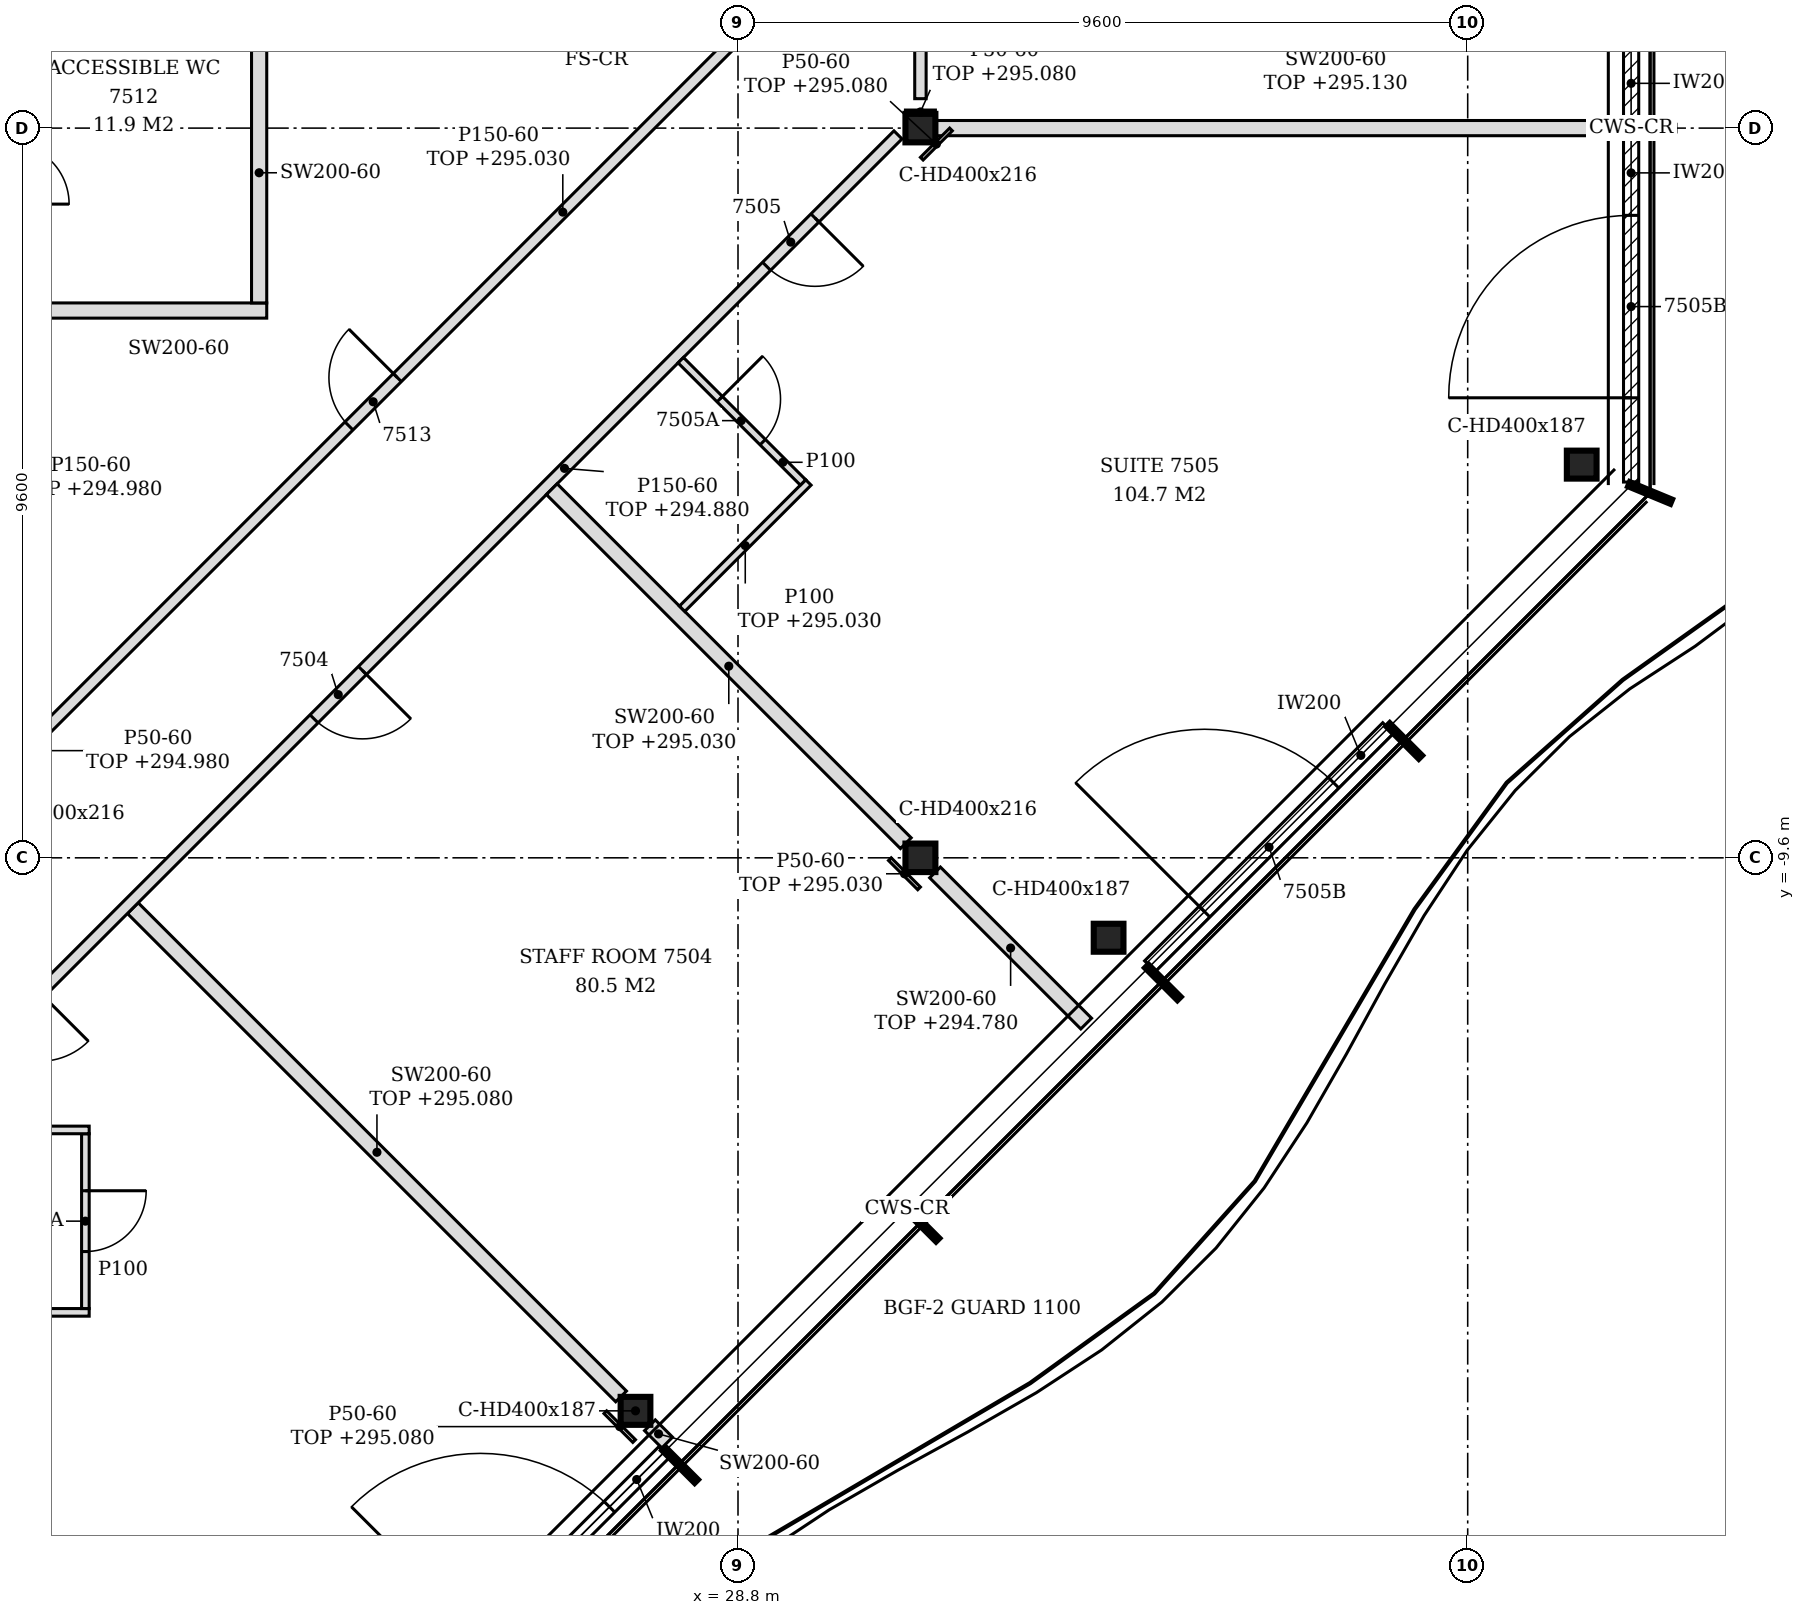
"""IFC4 building model, lengths in metres.
Left out: names, types, materials, properties, quantities, classifications, styles, units other than length and angle.
Written with IfcOpenShell. Run it as: python <this file> out.ifc"""

import sys

from ifc_helpers import new_model, si_unit, direction, frame, frame_2d, origin, origin_2d, place, context, subcontext, project, spatial, polyline, rectangle, i_section, outline, extrude, element, fill, save


model = new_model("IFC4")
c1 = context("Model", 3, precision=1e-05, world=origin(), true_north=direction((0.0, 1.0)))
c2 = subcontext(c1, "Body", "Model", "MODEL_VIEW")
j1 = project(units=[si_unit("LENGTHUNIT", "METRE"), si_unit("PLANEANGLEUNIT", "RADIAN")], contexts=[c1])
p1 = place(None, origin())
s1 = spatial("IfcSite", under=j1, at=p1, CompositionType="ELEMENT")
p2 = place(p1, origin())
s2 = spatial("IfcBuilding", under=s1, at=p2, CompositionType="ELEMENT")
p3 = place(p2, frame((0.0, 0.0, 292.2)))
s3 = spatial("IfcBuildingStorey", under=s2, at=p3, CompositionType="ELEMENT", Elevation=292.2)
for number, where, z_axis, x_axis in (
    (1, (27.451, -16.876, -0.15), (0.0, 0.0, 1.0), (1.0, 0.0, 0.0)),
    (2, (33.676, -10.652, -0.15), (0.0, 0.0, 1.0), (1.0, 0.0, 0.0)),
    (3, (39.9, -4.427, -0.15), (0.0, 0.0, 1.0), (1.0, 0.0, 0.0)),
):
    element("IfcColumn", number, at=place(p3, frame(where, z_axis=z_axis, x_axis=x_axis)), inside=s3, PredefinedType="COLUMN", context=c2, shape_type="SweptSolid", body=[
        extrude(i_section(OverallWidth=0.391, OverallDepth=0.368, WebThickness=0.015, FlangeThickness=0.024, FilletRadius=0.015, at=origin_2d()), origin(), (0.0, 0.0, 1.0), 3.55),
    ])
for number, where, z_axis, x_axis in (
    (4, (31.2, -9.6, -0.15), (0.0, 0.0, 1.0), (1.0, 0.0, 0.0)),
    (5, (31.2, 0.0, -0.15), (0.0, 0.0, 1.0), (1.0, 0.0, 0.0)),
):
    element("IfcColumn", number, at=place(p3, frame(where, z_axis=z_axis, x_axis=x_axis)), inside=s3, PredefinedType="COLUMN", context=c2, shape_type="SweptSolid", body=[
        extrude(i_section(OverallWidth=0.394, OverallDepth=0.375, WebThickness=0.017, FlangeThickness=0.028, FilletRadius=0.015, at=origin_2d()), origin(), (0.0, 0.0, 1.0), 3.55),
    ])
p4 = place(p3, frame((24.693, -20.553, 0.0), z_axis=(0.0, 0.0, 1.0), x_axis=(0.707079231393, 0.707134329907, 0.0)))
e6 = element("IfcWall", 6, at=p4, inside=s3, PredefinedType="NOTDEFINED", context=c2, shape_type="SweptSolid", body=[
    extrude(rectangle(XDim=4.431, YDim=0.2, at=frame_2d((2.215, 0.0))), origin(), (0.0, 0.0, 1.0), 3.4),
])
p5 = place(p4, frame((1.015, 0.0, 0.0)))
e7 = element("IfcOpeningElement", 7, at=p5, cuts=e6, PredefinedType="OPENING", context=c2, shape_type="SweptSolid", body=[
    extrude(rectangle(XDim=2.4, YDim=2.4, at=frame_2d((1.2, 1.2))), frame((0.0, 0.11, 0.0), z_axis=(0.0, -1.0, 0.0), x_axis=(1.0, 0.0, 0.0)), (0.0, 0.0, 1.0), 0.22),
])
p6 = place(p3, frame((34.22, -11.026, 0.0), z_axis=(0.0, 0.0, 1.0), x_axis=(0.707134329907, 0.707079231393, 0.0)))
e8 = element("IfcWall", 8, at=p6, inside=s3, PredefinedType="NOTDEFINED", context=c2, shape_type="SweptSolid", body=[
    extrude(rectangle(XDim=4.431, YDim=0.2, at=frame_2d((2.215, 0.0))), origin(), (0.0, 0.0, 1.0), 3.4),
])
p7 = place(p6, frame((1.015, 0.0, 0.0)))
e9 = element("IfcOpeningElement", 9, at=p7, cuts=e8, PredefinedType="OPENING", context=c2, shape_type="SweptSolid", body=[
    extrude(rectangle(XDim=2.4, YDim=2.4, at=frame_2d((1.2, 1.2))), frame((0.0, 0.11, 0.0), z_axis=(0.0, -1.0, 0.0), x_axis=(1.0, 0.0, 0.0)), (0.0, 0.0, 1.0), 0.22),
])
p8 = place(p3, frame((40.55, -4.656, 0.0), z_axis=(0.0, 0.0, 1.0), x_axis=(0.0, 1.0, 0.0)))
e10 = element("IfcWall", 10, at=p8, inside=s3, PredefinedType="NOTDEFINED", context=c2, shape_type="SweptSolid", body=[
    extrude(rectangle(XDim=4.626, YDim=0.2, at=frame_2d((2.313, 0.0))), origin(), (0.0, 0.0, 1.0), 3.4),
])
p9 = place(p8, frame((1.108, 0.0, 0.0)))
e11 = element("IfcOpeningElement", 11, at=p9, cuts=e10, PredefinedType="OPENING", context=c2, shape_type="SweptSolid", body=[
    extrude(rectangle(XDim=2.4, YDim=2.4, at=frame_2d((1.2, 1.2))), frame((0.0, 0.11, 0.0), z_axis=(0.0, -1.0, 0.0), x_axis=(1.0, 0.0, 0.0)), (0.0, 0.0, 1.0), 0.22),
])
p10 = place(p3, frame((40.55, 0.03, 0.0), z_axis=(0.0, 0.0, 1.0), x_axis=(0.0, 1.0, 0.0)))
e12 = element("IfcWall", 12, at=p10, inside=s3, PredefinedType="NOTDEFINED", context=c2, shape_type="SweptSolid", body=[
    extrude(rectangle(XDim=4.626, YDim=0.2, at=frame_2d((2.313, 0.0))), origin(), (0.0, 0.0, 1.0), 3.4),
])
p11 = place(p10, frame((1.118, 0.0, 0.0)))
e13 = element("IfcOpeningElement", 13, at=p11, cuts=e12, PredefinedType="OPENING", context=c2, shape_type="SweptSolid", body=[
    extrude(rectangle(XDim=2.4, YDim=2.4, at=frame_2d((1.2, 1.2))), frame((0.0, 0.11, 0.0), z_axis=(0.0, -1.0, 0.0), x_axis=(1.0, 0.0, 0.0)), (0.0, 0.0, 1.0), 0.22),
])
p12 = place(p3, frame((27.869, -17.293, 0.0), z_axis=(0.0, 0.0, 1.0), x_axis=(-0.707106781187, 0.707106781187, 0.0)))
e14 = element("IfcWall", 14, at=p12, inside=s3, PredefinedType="PARTITIONING", context=c2, shape_type="SweptSolid", body=[
    extrude(rectangle(XDim=0.322, YDim=0.2, at=frame_2d((0.161, 0.0))), origin(), (0.0, 0.0, 1.0), 3.4),
])
p13 = place(p3, frame((27.262, -16.686, 0.0), z_axis=(0.0, 0.0, 1.0), x_axis=(-0.707106781187, 0.707106781187, 0.0)))
e15 = element("IfcWall", 15, at=p13, inside=s3, PredefinedType="PARTITIONING", context=c2, shape_type="SweptSolid", body=[
    extrude(rectangle(XDim=9.085, YDim=0.2, at=frame_2d((4.542, 0.0))), origin(), (0.0, 0.0, 1.0), 2.88),
])
p14 = place(p3, frame((17.914, -15.58, 0.0), z_axis=(0.0, 0.0, 1.0), x_axis=(1.0, 0.0, 0.0)))
e16 = element("IfcWall", 16, at=p14, inside=s3, PredefinedType="PARTITIONING", context=c2, shape_type="SweptSolid", body=[
    extrude(outline(polyline([(0.0, 0.0), (2.35, 0.0), (2.35, 3.4), (1.436, 3.4), (1.434, 2.68), (1.136, 2.68), (1.134, 3.4), (0.0, 3.4), (0.0, 0.0)])), frame((0.0, 0.05, 0.0), z_axis=(0.0, -1.0, 0.0), x_axis=(1.0, 0.0, 0.0)), (0.0, 0.0, 1.0), 0.1),
])
p15 = place(p3, frame((20.214, -15.53, 0.0), z_axis=(0.0, 0.0, 1.0), x_axis=(0.0, 1.0, 0.0)))
e17 = element("IfcWall", 17, at=p15, inside=s3, PredefinedType="PARTITIONING", context=c2, shape_type="SweptSolid", body=[
    extrude(outline(polyline([(0.0, 0.0), (2.3, 0.0), (2.3, 3.4), (1.23, 3.4), (1.228, 2.88), (1.03, 2.88), (1.028, 3.4), (0.0, 3.4), (0.0, 0.0)])), frame((0.0, 0.05, 0.0), z_axis=(0.0, -1.0, 0.0), x_axis=(1.0, 0.0, 0.0)), (0.0, 0.0, 1.0), 0.1),
])
p16 = place(p15, frame((0.75, 0.0, 0.0)))
e18 = element("IfcOpeningElement", 18, at=p16, cuts=e17, PredefinedType="OPENING", context=c2, shape_type="SweptSolid", body=[
    extrude(rectangle(XDim=0.8, YDim=2.1, at=frame_2d((0.4, 1.05))), frame((0.0, 0.06, 0.0), z_axis=(0.0, -1.0, 0.0), x_axis=(1.0, 0.0, 0.0)), (0.0, 0.0, 1.0), 0.12),
])
p17 = place(p3, frame((16.722, -14.272, 0.0), z_axis=(0.0, 0.0, 1.0), x_axis=(0.707106781187, 0.707106781187, 0.0)))
e19 = element("IfcWall", 19, at=p17, inside=s3, PredefinedType="PARTITIONING", context=c2, shape_type="SweptSolid", body=[
    extrude(rectangle(XDim=20.058, YDim=0.15, at=frame_2d((10.029, 0.0))), origin(), (0.0, 0.0, 1.0), 2.68),
])
p18 = place(p17, frame((3.195, 0.0, 0.0)))
e20 = element("IfcOpeningElement", 20, at=p18, cuts=e19, PredefinedType="OPENING", context=c2, shape_type="SweptSolid", body=[
    extrude(rectangle(XDim=0.9, YDim=2.1, at=frame_2d((0.45, 1.05))), frame((0.0, 0.085, 0.0), z_axis=(0.0, -1.0, 0.0), x_axis=(1.0, 0.0, 0.0)), (0.0, 0.0, 1.0), 0.17),
])
p19 = place(p17, frame((9.193, 0.0, 0.0)))
e21 = element("IfcOpeningElement", 21, at=p19, cuts=e19, PredefinedType="OPENING", context=c2, shape_type="SweptSolid", body=[
    extrude(rectangle(XDim=0.9, YDim=2.1, at=frame_2d((0.45, 1.05))), frame((0.0, 0.085, 0.0), z_axis=(0.0, -1.0, 0.0), x_axis=(1.0, 0.0, 0.0)), (0.0, 0.0, 1.0), 0.17),
])
p20 = place(p17, frame((17.613, 0.0, 0.0)))
e22 = element("IfcOpeningElement", 22, at=p20, cuts=e19, PredefinedType="OPENING", context=c2, shape_type="SweptSolid", body=[
    extrude(rectangle(XDim=0.9, YDim=2.1, at=frame_2d((0.45, 1.05))), frame((0.0, 0.085, 0.0), z_axis=(0.0, -1.0, 0.0), x_axis=(1.0, 0.0, 0.0)), (0.0, 0.0, 1.0), 0.17),
])
p21 = place(p3, frame((17.97, -13.18, 0.0), z_axis=(0.0, 0.0, 1.0), x_axis=(1.0, 0.0, 0.0)))
e23 = element("IfcWall", 23, at=p21, inside=s3, PredefinedType="PARTITIONING", context=c2, shape_type="SweptSolid", body=[
    extrude(outline(polyline([(0.0, 0.0), (2.294, 0.0), (2.294, 3.4), (1.38, 3.4), (1.378, 2.68), (1.08, 2.68), (1.078, 3.4), (0.0, 3.4), (0.0, 0.0)])), frame((0.0, 0.05, 0.0), z_axis=(0.0, -1.0, 0.0), x_axis=(1.0, 0.0, 0.0)), (0.0, 0.0, 1.0), 0.1),
])
p22 = place(p3, frame((33.381, -11.781, 0.0), z_axis=(0.0, 0.0, 1.0), x_axis=(-0.707106781187, 0.707106781187, 0.0)))
e24 = element("IfcWall", 24, at=p22, inside=s3, PredefinedType="PARTITIONING", context=c2, shape_type="SweptSolid", body=[
    extrude(rectangle(XDim=2.812, YDim=0.2, at=frame_2d((1.406, 0.0))), origin(), (0.0, 0.0, 1.0), 2.58),
])
p23 = place(p3, frame((31.008, -9.408, 0.0), z_axis=(0.0, 0.0, 1.0), x_axis=(-0.707106781187, 0.707106781187, 0.0)))
e25 = element("IfcWall", 25, at=p23, inside=s3, PredefinedType="PARTITIONING", context=c2, shape_type="SweptSolid", body=[
    extrude(rectangle(XDim=6.587, YDim=0.2, at=frame_2d((3.293, 0.0))), origin(), (0.0, 0.0, 1.0), 2.83),
])
p24 = place(p3, frame((19.392, -8.208, 0.0), z_axis=(0.0, 0.0, 1.0), x_axis=(0.707106781187, 0.707106781187, 0.0)))
e26 = element("IfcWall", 26, at=p24, inside=s3, PredefinedType="PARTITIONING", context=c2, shape_type="SweptSolid", body=[
    extrude(rectangle(XDim=13.124, YDim=0.15, at=frame_2d((6.562, 0.0))), origin(), (0.0, 0.0, 1.0), 2.83),
])
p25 = place(p24, frame((6.066, 0.0, 0.0)))
e27 = element("IfcOpeningElement", 27, at=p25, cuts=e26, PredefinedType="OPENING", context=c2, shape_type="SweptSolid", body=[
    extrude(rectangle(XDim=0.9, YDim=2.1, at=frame_2d((0.45, 1.05))), frame((0.0, 0.085, 0.0), z_axis=(0.0, -1.0, 0.0), x_axis=(1.0, 0.0, 0.0)), (0.0, 0.0, 1.0), 0.17),
])
p26 = place(p3, frame((28.065, -6.323, 0.0), z_axis=(0.0, 0.0, 1.0), x_axis=(0.707106781187, 0.707106781187, 0.0)))
e28 = element("IfcWall", 28, at=p26, inside=s3, PredefinedType="PARTITIONING", context=c2, shape_type="SweptSolid", body=[
    extrude(rectangle(XDim=2.35, YDim=0.1, at=frame_2d((1.175, 0.0))), origin(), (0.0, 0.0, 1.0), 2.83),
])
p27 = place(p3, frame((29.656, -4.662, 0.0), z_axis=(0.0, 0.0, 1.0), x_axis=(-0.707053116953, 0.707160441348, 0.0)))
e29 = element("IfcWall", 29, at=p27, inside=s3, PredefinedType="PARTITIONING", context=c2, shape_type="SweptSolid", body=[
    extrude(rectangle(XDim=2.275, YDim=0.1, at=frame_2d((1.137, 0.0))), origin(), (0.0, 0.0, 1.0), 3.4),
])
p28 = place(p27, frame((0.75, 0.0, 0.0)))
e30 = element("IfcOpeningElement", 30, at=p28, cuts=e29, PredefinedType="OPENING", context=c2, shape_type="SweptSolid", body=[
    extrude(rectangle(XDim=0.8, YDim=2.1, at=frame_2d((0.4, 1.05))), frame((0.0, 0.06, 0.0), z_axis=(0.0, -1.0, 0.0), x_axis=(1.0, 0.0, 0.0)), (0.0, 0.0, 1.0), 0.12),
])
p29 = place(p3, frame((19.275, -2.4, 0.0), z_axis=(0.0, 0.0, 1.0), x_axis=(1.0, 0.0, 0.0)))
e31 = element("IfcWall", 31, at=p29, inside=s3, PredefinedType="PARTITIONING", context=c2, shape_type="SweptSolid", body=[
    extrude(outline(polyline([(0.0, 0.0), (3.325, 0.0), (3.325, 3.4), (0.075, 3.4), (0.073, 2.78), (0.0, 2.78), (0.0, 0.0)])), frame((0.0, 0.1, 0.0), z_axis=(0.0, -1.0, 0.0), x_axis=(1.0, 0.0, 0.0)), (0.0, 0.0, 1.0), 0.2),
])
p30 = place(p3, frame((22.5, -2.3, 0.0), z_axis=(0.0, 0.0, 1.0), x_axis=(0.0, 1.0, 0.0)))
e32 = element("IfcWall", 32, at=p30, inside=s3, PredefinedType="PARTITIONING", context=c2, shape_type="SweptSolid", body=[
    extrude(outline(polyline([(0.0, 0.0), (3.425, 0.0), (3.425, 3.4), (2.405, 3.4), (2.403, 2.83), (2.195, 2.83), (2.193, 3.4), (0.0, 3.4), (0.0, 0.0)])), frame((0.0, 0.1, 0.0), z_axis=(0.0, -1.0, 0.0), x_axis=(1.0, 0.0, 0.0)), (0.0, 0.0, 1.0), 0.2),
])
p31 = place(p3, frame((31.397, 0.0, 0.0), z_axis=(0.0, 0.0, 1.0), x_axis=(1.0, 0.0, 0.0)))
e33 = element("IfcWall", 33, at=p31, inside=s3, PredefinedType="PARTITIONING", context=c2, shape_type="SweptSolid", body=[
    extrude(outline(polyline([(0.0, 0.0), (9.053, 0.0), (9.053, 2.93), (8.653, 2.93), (8.651, 2.88), (8.353, 2.88), (8.351, 2.93), (0.0, 2.93), (0.0, 0.0)])), frame((0.0, 0.1, 0.0), z_axis=(0.0, -1.0, 0.0), x_axis=(1.0, 0.0, 0.0)), (0.0, 0.0, 1.0), 0.2),
])
p32 = place(p3, frame((31.2, 0.387, 0.0), z_axis=(0.0, 0.0, 1.0), x_axis=(0.0, 1.0, 0.0)))
e34 = element("IfcWall", 34, at=p32, inside=s3, PredefinedType="PARTITIONING", context=c2, shape_type="SweptSolid", body=[
    extrude(rectangle(XDim=4.313, YDim=0.15, at=frame_2d((2.156, 0.0))), origin(), (0.0, 0.0, 1.0), 2.88),
])
p33 = place(p3, frame((27.434, -17.273, 0.0), z_axis=(0.0, 0.0, 1.0), x_axis=(-0.707106781187, 0.707106781187, 0.0)))
e35 = element("IfcWall", 35, at=p33, inside=s3, PredefinedType="PARTITIONING", context=c2, shape_type="SweptSolid", body=[
    extrude(rectangle(XDim=0.537, YDim=0.05, at=frame_2d((0.269, 0.0))), origin(), (0.0, 0.0, 1.0), 2.88),
])
p34 = place(p3, frame((31.218, -0.402, 0.0), z_axis=(0.0, 0.0, 1.0), x_axis=(0.707106781187, 0.707106781187, 0.0)))
e36 = element("IfcWall", 36, at=p34, inside=s3, PredefinedType="PARTITIONING", context=c2, shape_type="SweptSolid", body=[
    extrude(rectangle(XDim=0.544, YDim=0.05, at=frame_2d((0.272, 0.0))), origin(), (0.0, 0.0, 1.0), 2.88),
])
p35 = place(p3, frame((31.182, -10.002, 0.0), z_axis=(0.0, 0.0, 1.0), x_axis=(-0.707106781187, 0.707106781187, 0.0)))
e37 = element("IfcWall", 37, at=p35, inside=s3, PredefinedType="PARTITIONING", context=c2, shape_type="SweptSolid", body=[
    extrude(rectangle(XDim=0.544, YDim=0.05, at=frame_2d((0.272, 0.0))), origin(), (0.0, 0.0, 1.0), 2.83),
])
p36 = place(p3, frame((31.003, 0.212, 0.0), z_axis=(0.0, 0.0, 1.0), x_axis=(1.0, 0.0, 0.0)))
e38 = element("IfcWall", 38, at=p36, inside=s3, PredefinedType="PARTITIONING", context=c2, shape_type="SweptSolid", body=[
    extrude(rectangle(XDim=0.394, YDim=0.05, at=frame_2d((0.197, 0.0))), origin(), (0.0, 0.0, 1.0), 2.88),
])
p37 = place(p5, origin())
e39 = element("IfcDoor", 39, at=p37, inside=s3, OperationType="SINGLE_SWING_LEFT", PredefinedType="DOOR", context=c2, shape_type="SweptSolid", body=[
    extrude(rectangle(XDim=2.4, YDim=2.4, at=frame_2d((1.2, 1.2))), frame((0.0, 0.025, 0.0), z_axis=(0.0, -1.0, 0.0), x_axis=(1.0, 0.0, 0.0)), (0.0, 0.0, 1.0), 0.05),
])
fill(e7, e39)
p38 = place(p7, origin())
e40 = element("IfcDoor", 40, at=p38, inside=s3, OperationType="SINGLE_SWING_LEFT", PredefinedType="DOOR", context=c2, shape_type="SweptSolid", body=[
    extrude(rectangle(XDim=2.4, YDim=2.4, at=frame_2d((1.2, 1.2))), frame((0.0, 0.025, 0.0), z_axis=(0.0, -1.0, 0.0), x_axis=(1.0, 0.0, 0.0)), (0.0, 0.0, 1.0), 0.05),
])
fill(e9, e40)
p39 = place(p9, origin())
e41 = element("IfcDoor", 41, at=p39, inside=s3, OperationType="SINGLE_SWING_LEFT", PredefinedType="DOOR", context=c2, shape_type="SweptSolid", body=[
    extrude(rectangle(XDim=2.4, YDim=2.4, at=frame_2d((1.2, 1.2))), frame((0.0, 0.025, 0.0), z_axis=(0.0, -1.0, 0.0), x_axis=(1.0, 0.0, 0.0)), (0.0, 0.0, 1.0), 0.05),
])
fill(e11, e41)
p40 = place(p16, frame((0.8, 0.0, 0.0), z_axis=(0.0, 0.0, 1.0), x_axis=(-1.0, 0.0, 0.0)))
e42 = element("IfcDoor", 42, at=p40, inside=s3, OperationType="SINGLE_SWING_LEFT", PredefinedType="DOOR", context=c2, shape_type="SweptSolid", body=[
    extrude(rectangle(XDim=0.8, YDim=2.1, at=frame_2d((0.4, 1.05))), frame((0.0, 0.025, 0.0), z_axis=(0.0, -1.0, 0.0), x_axis=(1.0, 0.0, 0.0)), (0.0, 0.0, 1.0), 0.05),
])
fill(e18, e42)
p41 = place(p19, frame((0.9, 0.0, 0.0), z_axis=(0.0, 0.0, 1.0), x_axis=(-1.0, 0.0, 0.0)))
e43 = element("IfcDoor", 43, at=p41, inside=s3, OperationType="SINGLE_SWING_LEFT", PredefinedType="DOOR", context=c2, shape_type="SweptSolid", body=[
    extrude(rectangle(XDim=0.9, YDim=2.1, at=frame_2d((0.45, 1.05))), frame((0.0, 0.025, 0.0), z_axis=(0.0, -1.0, 0.0), x_axis=(1.0, 0.0, 0.0)), (0.0, 0.0, 1.0), 0.05),
])
fill(e21, e43)
p42 = place(p20, frame((0.9, 0.0, 0.0), z_axis=(0.0, 0.0, 1.0), x_axis=(-1.0, 0.0, 0.0)))
e44 = element("IfcDoor", 44, at=p42, inside=s3, OperationType="SINGLE_SWING_LEFT", PredefinedType="DOOR", context=c2, shape_type="SweptSolid", body=[
    extrude(rectangle(XDim=0.9, YDim=2.1, at=frame_2d((0.45, 1.05))), frame((0.0, 0.025, 0.0), z_axis=(0.0, -1.0, 0.0), x_axis=(1.0, 0.0, 0.0)), (0.0, 0.0, 1.0), 0.05),
])
fill(e22, e44)
p43 = place(p28, frame((0.8, 0.0, 0.0), z_axis=(0.0, 0.0, 1.0), x_axis=(-1.0, 0.0, 0.0)))
e45 = element("IfcDoor", 45, at=p43, inside=s3, OperationType="SINGLE_SWING_LEFT", PredefinedType="DOOR", context=c2, shape_type="SweptSolid", body=[
    extrude(rectangle(XDim=0.8, YDim=2.1, at=frame_2d((0.4, 1.05))), frame((0.0, 0.025, 0.0), z_axis=(0.0, -1.0, 0.0), x_axis=(1.0, 0.0, 0.0)), (0.0, 0.0, 1.0), 0.05),
])
fill(e30, e45)
p44 = place(p25, origin())
e46 = element("IfcDoor", 46, at=p44, inside=s3, OperationType="SINGLE_SWING_RIGHT", PredefinedType="DOOR", context=c2, shape_type="SweptSolid", body=[
    extrude(rectangle(XDim=0.9, YDim=2.1, at=frame_2d((0.45, 1.05))), frame((0.0, 0.025, 0.0), z_axis=(0.0, -1.0, 0.0), x_axis=(1.0, 0.0, 0.0)), (0.0, 0.0, 1.0), 0.05),
])
fill(e27, e46)
save(model, sys.argv[1])
